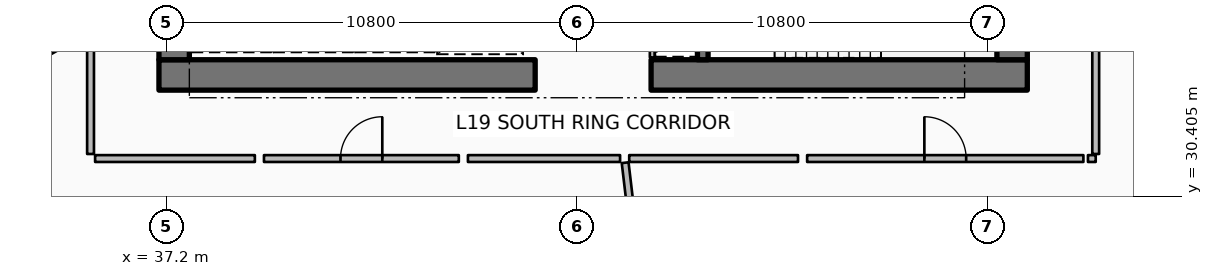
"""IFC4 building model, lengths in metres.
Left out: names, types, materials, properties, quantities, classifications, styles, units other than length and angle.
Written with IfcOpenShell. Run it as: python <this file> out.ifc"""

import sys

from ifc_helpers import new_model, si_unit, direction, frame, frame_2d, origin, place, context, subcontext, project, spatial, rectangle, extrude, element, fill, save


model = new_model("IFC4")
c1 = context("Model", 3, precision=1e-05, world=origin(), true_north=direction((0.0, 1.0)))
c2 = subcontext(c1, "Body", "Model", "MODEL_VIEW")
j1 = project(units=[si_unit("LENGTHUNIT", "METRE"), si_unit("PLANEANGLEUNIT", "RADIAN")], contexts=[c1])
p1 = place(None, origin())
s1 = spatial("IfcSite", under=j1, at=p1, CompositionType="ELEMENT")
p2 = place(p1, origin())
s2 = spatial("IfcBuilding", under=s1, at=p2, CompositionType="ELEMENT")
p3 = place(p2, frame((0.0, 0.0, 78.9)))
s3 = spatial("IfcBuildingStorey", under=s2, at=p3, CompositionType="ELEMENT", Elevation=78.9)
p4 = place(p3, frame((37.0, 33.6, 0.0), z_axis=(0.0, 0.0, 1.0), x_axis=(1.0, 0.0, 0.0)))
e1 = element("IfcWall", 1, at=p4, inside=s3, PredefinedType="SHEAR", context=c2, shape_type="SweptSolid", body=[
    extrude(rectangle(XDim=9.9, YDim=0.8, at=frame_2d((4.95, 0.0))), origin(), (0.0, 0.0, 1.0), 3.75),
])
p5 = place(p3, frame((49.95, 33.6, 0.0), z_axis=(0.0, 0.0, 1.0), x_axis=(1.0, 0.0, 0.0)))
e2 = element("IfcWall", 2, at=p5, inside=s3, PredefinedType="SHEAR", context=c2, shape_type="SweptSolid", body=[
    extrude(rectangle(XDim=9.9, YDim=0.8, at=frame_2d((4.95, 0.0))), origin(), (0.0, 0.0, 1.0), 3.75),
])
for number, where, z_axis, x_axis in (
    (3, (37.4, 34.0, 0.0), (0.0, 0.0, 1.0), (0.0, 1.0, 0.0)),
    (4, (59.45, 34.0, 0.0), (0.0, 0.0, 1.0), (0.0, 1.0, 0.0)),
):
    element("IfcWall", number, at=place(p3, frame(where, z_axis=z_axis, x_axis=x_axis)), inside=s3, PredefinedType="SHEAR", context=c2, shape_type="SweptSolid", body=[
        extrude(rectangle(XDim=16.0, YDim=0.8, at=frame_2d((8.0, 0.0))), origin(), (0.0, 0.0, 1.0), 3.75),
    ])
p6 = place(p3, frame((51.31, 34.0, 0.0), z_axis=(0.0, 0.0, 1.0), x_axis=(0.0, 1.0, 0.0)))
e5 = element("IfcWall", 5, at=p6, inside=s3, PredefinedType="SHEAR", context=c2, shape_type="SweptSolid", body=[
    extrude(rectangle(XDim=3.5, YDim=0.28, at=frame_2d((1.75, 0.0))), origin(), (0.0, 0.0, 1.0), 3.75),
])
p7 = place(p3, frame((49.98, 34.06, 0.0), z_axis=(0.0, 0.0, 1.0), x_axis=(0.0, 1.0, 0.0)))
e6 = element("IfcWall", 6, at=p7, inside=s3, PredefinedType="PARTITIONING", context=c2, shape_type="SweptSolid", body=[
    extrude(rectangle(XDim=3.4, YDim=0.125, at=frame_2d((1.7, 0.0))), origin(), (0.0, 0.0, 1.0), 2.94),
])
p8 = place(p3, frame((35.104, 34.778, 0.0), z_axis=(0.0, 0.0, 1.0), x_axis=(-0.872490437896, -0.488631185845, 0.0)))
e7 = element("IfcWall", 7, at=p8, inside=s3, PredefinedType="PARTITIONING", context=c2, shape_type="SweptSolid", body=[
    extrude(rectangle(XDim=14.699, YDim=0.18, at=frame_2d((7.35, 0.0))), origin(), (0.0, 0.0, 1.0), 2.94),
])
p9 = place(p3, frame((49.268, 31.291, 0.0), z_axis=(0.0, 0.0, 1.0), x_axis=(0.117532311618, -0.993069058891, 0.0)))
e8 = element("IfcWall", 8, at=p9, inside=s3, PredefinedType="PARTITIONING", context=c2, shape_type="SweptSolid", body=[
    extrude(rectangle(XDim=13.138, YDim=0.18, at=frame_2d((6.569, 0.0))), origin(), (0.0, 0.0, 1.0), 2.94),
])
p10 = place(p3, frame((61.756, 38.12, 0.0), z_axis=(0.0, 0.0, 1.0), x_axis=(0.962455861176, -0.271438234756, 0.0)))
e9 = element("IfcWall", 9, at=p10, inside=s3, PredefinedType="PARTITIONING", context=c2, shape_type="SweptSolid", body=[
    extrude(rectangle(XDim=14.279, YDim=0.18, at=frame_2d((7.139, 0.0))), origin(), (0.0, 0.0, 1.0), 2.94),
])
p11 = place(p3, frame((39.764, 31.4, 0.0), z_axis=(0.0, 0.0, 1.0), x_axis=(1.0, 0.0, 0.0)))
e10 = element("IfcWall", 10, at=p11, inside=s3, PredefinedType="PARTITIONING", context=c2, shape_type="SweptSolid", body=[
    extrude(rectangle(XDim=5.127, YDim=0.18, at=frame_2d((2.563, 0.0))), origin(), (0.0, 0.0, 1.0), 2.94),
])
p12 = place(p11, frame((2.013, 0.0, 0.0)))
e11 = element("IfcOpeningElement", 11, at=p12, cuts=e10, PredefinedType="OPENING", context=c2, shape_type="SweptSolid", body=[
    extrude(rectangle(XDim=1.1, YDim=2.1, at=frame_2d((0.55, 1.05))), frame((0.0, 0.1, 0.0), z_axis=(0.0, -1.0, 0.0), x_axis=(1.0, 0.0, 0.0)), (0.0, 0.0, 1.0), 0.2),
])
p13 = place(p3, frame((35.2, 34.712, 0.0), z_axis=(0.0, 0.0, 1.0), x_axis=(0.0, -1.0, 0.0)))
e12 = element("IfcWall", 12, at=p13, inside=s3, PredefinedType="PARTITIONING", context=c2, shape_type="SweptSolid", body=[
    extrude(rectangle(XDim=3.192, YDim=0.18, at=frame_2d((1.596, 0.0))), origin(), (0.0, 0.0, 1.0), 2.94),
])
p14 = place(p3, frame((35.32, 31.4, 0.0), z_axis=(0.0, 0.0, 1.0), x_axis=(1.0, 0.0, 0.0)))
e13 = element("IfcWall", 13, at=p14, inside=s3, PredefinedType="PARTITIONING", context=c2, shape_type="SweptSolid", body=[
    extrude(rectangle(XDim=4.204, YDim=0.18, at=frame_2d((2.102, 0.0))), origin(), (0.0, 0.0, 1.0), 2.94),
])
p15 = place(p3, frame((33.092, 30.74, 0.0), z_axis=(0.0, 0.0, 1.0), x_axis=(0.653244508484, -0.757147021479, 0.0)))
e14 = element("IfcWall", 14, at=p15, inside=s3, PredefinedType="PARTITIONING", context=c2, shape_type="SweptSolid", body=[
    extrude(rectangle(XDim=2.439, YDim=0.125, at=frame_2d((1.219, 0.0))), origin(), (0.0, 0.0, 1.0), 2.94),
])
p16 = place(p15, frame((0.794, 0.0, 0.0)))
e15 = element("IfcOpeningElement", 15, at=p16, cuts=e14, PredefinedType="OPENING", context=c2, shape_type="SweptSolid", body=[
    extrude(rectangle(XDim=0.85, YDim=2.06, at=frame_2d((0.425, 1.03))), frame((0.0, 0.073, 0.0), z_axis=(0.0, -1.0, 0.0), x_axis=(1.0, 0.0, 0.0)), (0.0, 0.0, 1.0), 0.145),
])
p17 = place(p3, frame((45.131, 31.4, 0.0), z_axis=(0.0, 0.0, 1.0), x_axis=(1.0, 0.0, 0.0)))
e16 = element("IfcWall", 16, at=p17, inside=s3, PredefinedType="PARTITIONING", context=c2, shape_type="SweptSolid", body=[
    extrude(rectangle(XDim=4.004, YDim=0.18, at=frame_2d((2.002, 0.0))), origin(), (0.0, 0.0, 1.0), 2.94),
])
p18 = place(p3, frame((54.056, 31.4, 0.0), z_axis=(0.0, 0.0, 1.0), x_axis=(1.0, 0.0, 0.0)))
e17 = element("IfcWall", 17, at=p18, inside=s3, PredefinedType="PARTITIONING", context=c2, shape_type="SweptSolid", body=[
    extrude(rectangle(XDim=7.27, YDim=0.18, at=frame_2d((3.635, 0.0))), origin(), (0.0, 0.0, 1.0), 2.94),
])
p19 = place(p18, frame((3.085, 0.0, 0.0)))
e18 = element("IfcOpeningElement", 18, at=p19, cuts=e17, PredefinedType="OPENING", context=c2, shape_type="SweptSolid", body=[
    extrude(rectangle(XDim=1.1, YDim=2.1, at=frame_2d((0.55, 1.05))), frame((0.0, 0.1, 0.0), z_axis=(0.0, -1.0, 0.0), x_axis=(1.0, 0.0, 0.0)), (0.0, 0.0, 1.0), 0.2),
])
p20 = place(p3, frame((49.375, 31.4, 0.0), z_axis=(0.0, 0.0, 1.0), x_axis=(1.0, 0.0, 0.0)))
e19 = element("IfcWall", 19, at=p20, inside=s3, PredefinedType="PARTITIONING", context=c2, shape_type="SweptSolid", body=[
    extrude(rectangle(XDim=4.442, YDim=0.18, at=frame_2d((2.221, 0.0))), origin(), (0.0, 0.0, 1.0), 2.94),
])
p21 = place(p3, frame((61.446, 31.4, 0.0), z_axis=(0.0, 0.0, 1.0), x_axis=(1.0, 0.0, 0.0)))
e20 = element("IfcWall", 20, at=p21, inside=s3, PredefinedType="PARTITIONING", context=c2, shape_type="SweptSolid", body=[
    extrude(rectangle(XDim=0.204, YDim=0.18, at=frame_2d((0.102, 0.0))), origin(), (0.0, 0.0, 1.0), 2.94),
])
p22 = place(p3, frame((61.65, 31.52, 0.0), z_axis=(0.0, 0.0, 1.0), x_axis=(0.0, 1.0, 0.0)))
e21 = element("IfcWall", 21, at=p22, inside=s3, PredefinedType="PARTITIONING", context=c2, shape_type="SweptSolid", body=[
    extrude(rectangle(XDim=6.51, YDim=0.18, at=frame_2d((3.255, 0.0))), origin(), (0.0, 0.0, 1.0), 2.94),
])
p23 = place(p12, origin())
e22 = element("IfcDoor", 22, at=p23, inside=s3, OperationType="SINGLE_SWING_RIGHT", PredefinedType="DOOR", context=c2, shape_type="SweptSolid", body=[
    extrude(rectangle(XDim=1.1, YDim=2.1, at=frame_2d((0.55, 1.05))), frame((0.0, 0.025, 0.0), z_axis=(0.0, -1.0, 0.0), x_axis=(1.0, 0.0, 0.0)), (0.0, 0.0, 1.0), 0.05),
])
fill(e11, e22)
p24 = place(p19, origin())
e23 = element("IfcDoor", 23, at=p24, inside=s3, OperationType="SINGLE_SWING_LEFT", PredefinedType="DOOR", context=c2, shape_type="SweptSolid", body=[
    extrude(rectangle(XDim=1.1, YDim=2.1, at=frame_2d((0.55, 1.05))), frame((0.0, 0.025, 0.0), z_axis=(0.0, -1.0, 0.0), x_axis=(1.0, 0.0, 0.0)), (0.0, 0.0, 1.0), 0.05),
])
fill(e18, e23)
save(model, sys.argv[1])
